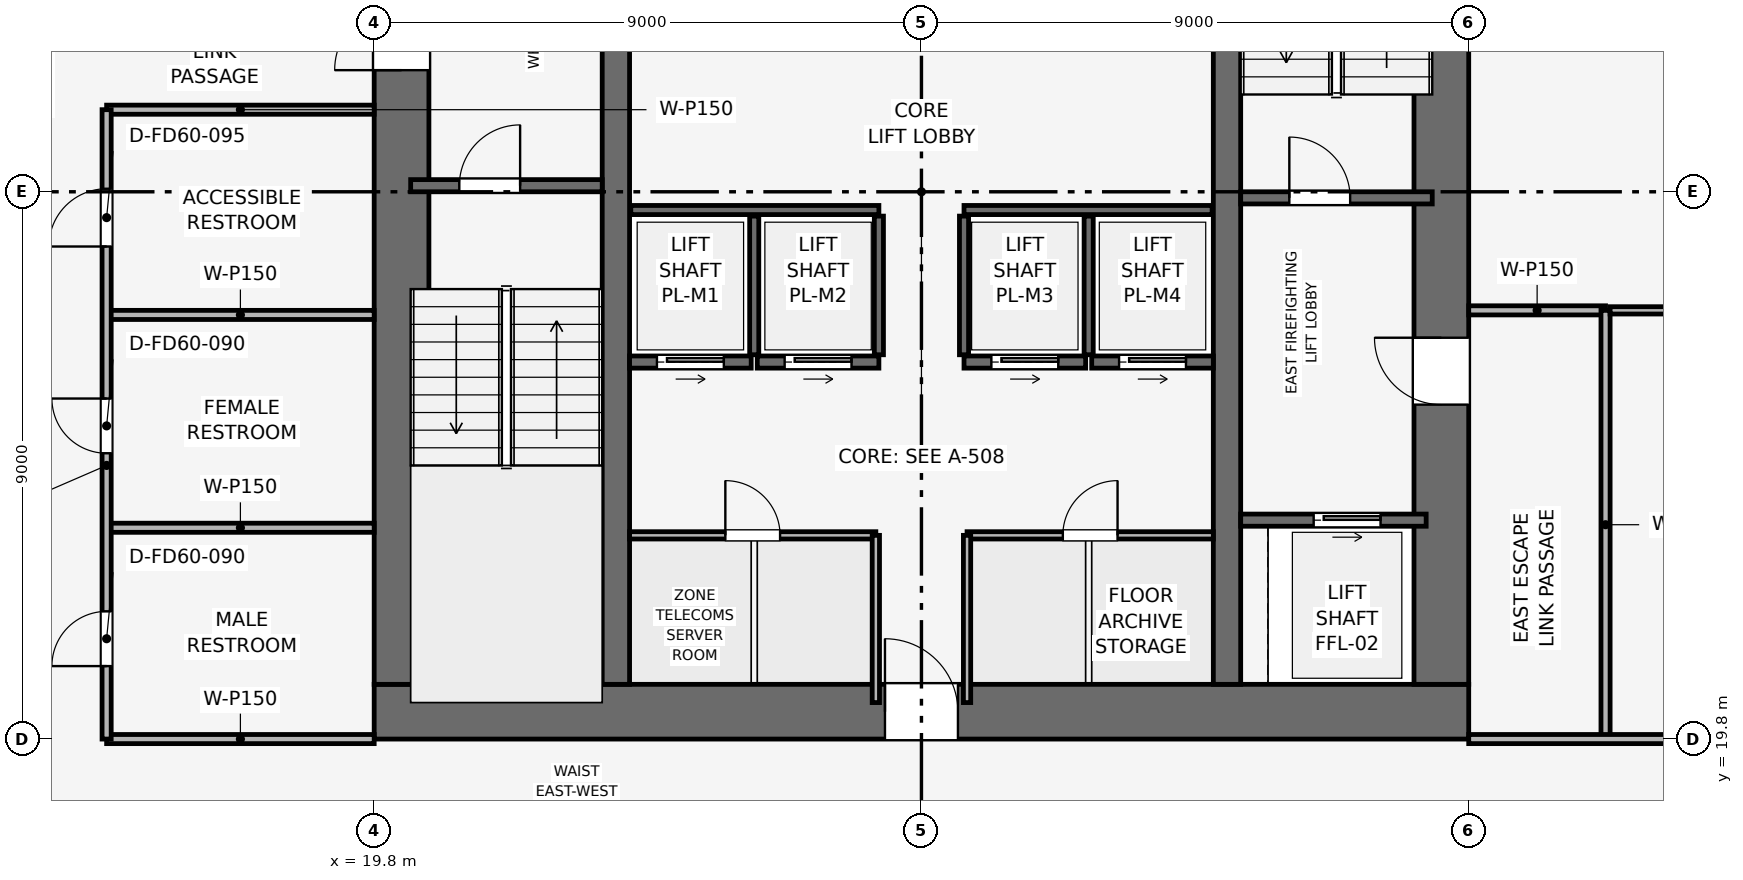
"""IFC4 building model, lengths in metres.
Left out: names, types, materials, properties, quantities, classifications, styles, units other than length and angle.
Written with IfcOpenShell. Run it as: python <this file> out.ifc"""

import sys

from ifc_helpers import new_model, si_unit, direction, frame, frame_2d, origin, place, context, subcontext, project, spatial, rectangle, extrude, element, fill, save


model = new_model("IFC4")
c1 = context("Model", 3, precision=1e-05, world=origin(), true_north=direction((0.0, 1.0)))
c2 = subcontext(c1, "Body", "Model", "MODEL_VIEW")
j1 = project(units=[si_unit("LENGTHUNIT", "METRE"), si_unit("PLANEANGLEUNIT", "RADIAN")], contexts=[c1])
p1 = place(None, origin())
s1 = spatial("IfcSite", under=j1, at=p1, CompositionType="ELEMENT")
p2 = place(p1, origin())
s2 = spatial("IfcBuilding", under=s1, at=p2, CompositionType="ELEMENT")
p3 = place(p2, frame((0.0, 0.0, 183.3)))
s3 = spatial("IfcBuildingStorey", under=s2, at=p3, CompositionType="ELEMENT", Elevation=183.3)
p4 = place(p3, frame((19.8, 20.25, 0.0), z_axis=(0.0, 0.0, 1.0), x_axis=(1.0, 0.0, 0.0)))
e1 = element("IfcWall", 1, at=p4, inside=s3, PredefinedType="SHEAR", context=c2, shape_type="SweptSolid", body=[
    extrude(rectangle(XDim=18.0, YDim=0.9, at=frame_2d((9.0, 0.0))), origin(), (0.0, 0.0, 1.0), 3.75),
])
p5 = place(p4, frame((8.4, 0.0, 0.0)))
e2 = element("IfcOpeningElement", 2, at=p5, cuts=e1, PredefinedType="OPENING", context=c2, shape_type="SweptSolid", body=[
    extrude(rectangle(XDim=1.2, YDim=2.2, at=frame_2d((0.6, 1.1))), frame((0.0, 0.46, 0.0), z_axis=(0.0, -1.0, 0.0), x_axis=(1.0, 0.0, 0.0)), (0.0, 0.0, 1.0), 0.92),
])
p6 = place(p3, frame((20.25, 20.7, 0.0), z_axis=(0.0, 0.0, 1.0), x_axis=(0.0, 1.0, 0.0)))
e3 = element("IfcWall", 3, at=p6, inside=s3, PredefinedType="SHEAR", context=c2, shape_type="SweptSolid", body=[
    extrude(rectangle(XDim=16.2, YDim=0.9, at=frame_2d((8.1, 0.0))), origin(), (0.0, 0.0, 1.0), 3.75),
])
p7 = place(p6, frame((10.1, 0.0, 0.0)))
e4 = element("IfcOpeningElement", 4, at=p7, cuts=e3, PredefinedType="OPENING", context=c2, shape_type="SweptSolid", body=[
    extrude(rectangle(XDim=1.1, YDim=2.15, at=frame_2d((0.55, 1.075))), frame((0.0, 0.46, 0.0), z_axis=(0.0, -1.0, 0.0), x_axis=(1.0, 0.0, 0.0)), (0.0, 0.0, 1.0), 0.92),
])
p8 = place(p3, frame((37.35, 20.7, 0.0), z_axis=(0.0, 0.0, 1.0), x_axis=(0.0, 1.0, 0.0)))
e5 = element("IfcWall", 5, at=p8, inside=s3, PredefinedType="SHEAR", context=c2, shape_type="SweptSolid", body=[
    extrude(rectangle(XDim=16.2, YDim=0.9, at=frame_2d((8.1, 0.0))), origin(), (0.0, 0.0, 1.0), 3.75),
])
p9 = place(p8, frame((4.6, 0.0, 0.0)))
e6 = element("IfcOpeningElement", 6, at=p9, cuts=e5, PredefinedType="OPENING", context=c2, shape_type="SweptSolid", body=[
    extrude(rectangle(XDim=1.1, YDim=2.15, at=frame_2d((0.55, 1.075))), frame((0.0, 0.46, 0.0), z_axis=(0.0, -1.0, 0.0), x_axis=(1.0, 0.0, 0.0)), (0.0, 0.0, 1.0), 0.92),
])
for number, where, z_axis, x_axis in (
    (7, (23.775, 20.7, 0.0), (0.0, 0.0, 1.0), (0.0, 1.0, 0.0)),
    (8, (33.825, 20.7, 0.0), (0.0, 0.0, 1.0), (0.0, 1.0, 0.0)),
):
    element("IfcWall", number, at=place(p3, frame(where, z_axis=z_axis, x_axis=x_axis)), inside=s3, PredefinedType="SHEAR", context=c2, shape_type="SweptSolid", body=[
        extrude(rectangle(XDim=16.2, YDim=0.45, at=frame_2d((8.1, 0.0))), origin(), (0.0, 0.0, 1.0), 3.75),
    ])
p10 = place(p3, frame((20.4, 28.9, 0.0), z_axis=(0.0, 0.0, 1.0), x_axis=(1.0, 0.0, 0.0)))
e9 = element("IfcWall", 9, at=p10, inside=s3, PredefinedType="SHEAR", context=c2, shape_type="SweptSolid", body=[
    extrude(rectangle(XDim=3.15, YDim=0.2, at=frame_2d((1.575, 0.0))), origin(), (0.0, 0.0, 1.0), 3.495),
])
p11 = place(p10, frame((0.8, 0.0, 0.0)))
e10 = element("IfcOpeningElement", 10, at=p11, cuts=e9, PredefinedType="OPENING", context=c2, shape_type="SweptSolid", body=[
    extrude(rectangle(XDim=1.0, YDim=2.1, at=frame_2d((0.5, 1.05))), frame((0.0, 0.11, 0.0), z_axis=(0.0, -1.0, 0.0), x_axis=(1.0, 0.0, 0.0)), (0.0, 0.0, 1.0), 0.22),
])
p12 = place(p3, frame((34.05, 28.7, 0.0), z_axis=(0.0, 0.0, 1.0), x_axis=(1.0, 0.0, 0.0)))
e11 = element("IfcWall", 11, at=p12, inside=s3, PredefinedType="SHEAR", context=c2, shape_type="SweptSolid", body=[
    extrude(rectangle(XDim=3.15, YDim=0.2, at=frame_2d((1.575, 0.0))), origin(), (0.0, 0.0, 1.0), 3.495),
])
p13 = place(p12, frame((0.8, 0.0, 0.0)))
e12 = element("IfcOpeningElement", 12, at=p13, cuts=e11, PredefinedType="OPENING", context=c2, shape_type="SweptSolid", body=[
    extrude(rectangle(XDim=1.0, YDim=2.1, at=frame_2d((0.5, 1.05))), frame((0.0, 0.11, 0.0), z_axis=(0.0, -1.0, 0.0), x_axis=(1.0, 0.0, 0.0)), (0.0, 0.0, 1.0), 0.22),
])
p14 = place(p3, frame((34.05, 23.4, 0.0), z_axis=(0.0, 0.0, 1.0), x_axis=(1.0, 0.0, 0.0)))
e13 = element("IfcWall", 13, at=p14, inside=s3, PredefinedType="SHEAR", context=c2, shape_type="SweptSolid", body=[
    extrude(rectangle(XDim=3.05, YDim=0.2, at=frame_2d((1.525, 0.0))), origin(), (0.0, 0.0, 1.0), 3.495),
])
p15 = place(p14, frame((1.2, 0.0, 0.0)))
e14 = element("IfcOpeningElement", 14, at=p15, cuts=e13, PredefinedType="OPENING", context=c2, shape_type="SweptSolid", body=[
    extrude(rectangle(XDim=1.1, YDim=2.15, at=frame_2d((0.55, 1.075))), frame((0.0, 0.11, 0.0), z_axis=(0.0, -1.0, 0.0), x_axis=(1.0, 0.0, 0.0)), (0.0, 0.0, 1.0), 0.22),
])
p16 = place(p3, frame((24.0, 26.0, 0.0), z_axis=(0.0, 0.0, 1.0), x_axis=(1.0, 0.0, 0.0)))
e15 = element("IfcWall", 15, at=p16, inside=s3, PredefinedType="SHEAR", context=c2, shape_type="SweptSolid", body=[
    extrude(rectangle(XDim=2.0, YDim=0.2, at=frame_2d((1.0, 0.0))), origin(), (0.0, 0.0, 1.0), 3.495),
])
p17 = place(p16, frame((0.45, 0.0, 0.0)))
e16 = element("IfcOpeningElement", 16, at=p17, cuts=e15, PredefinedType="OPENING", context=c2, shape_type="SweptSolid", body=[
    extrude(rectangle(XDim=1.1, YDim=2.15, at=frame_2d((0.55, 1.075))), frame((0.0, 0.11, 0.0), z_axis=(0.0, -1.0, 0.0), x_axis=(1.0, 0.0, 0.0)), (0.0, 0.0, 1.0), 0.22),
])
p18 = place(p3, frame((26.1, 26.0, 0.0), z_axis=(0.0, 0.0, 1.0), x_axis=(1.0, 0.0, 0.0)))
e17 = element("IfcWall", 17, at=p18, inside=s3, PredefinedType="SHEAR", context=c2, shape_type="SweptSolid", body=[
    extrude(rectangle(XDim=2.0, YDim=0.2, at=frame_2d((1.0, 0.0))), origin(), (0.0, 0.0, 1.0), 3.495),
])
p19 = place(p18, frame((0.45, 0.0, 0.0)))
e18 = element("IfcOpeningElement", 18, at=p19, cuts=e17, PredefinedType="OPENING", context=c2, shape_type="SweptSolid", body=[
    extrude(rectangle(XDim=1.1, YDim=2.15, at=frame_2d((0.55, 1.075))), frame((0.0, 0.11, 0.0), z_axis=(0.0, -1.0, 0.0), x_axis=(1.0, 0.0, 0.0)), (0.0, 0.0, 1.0), 0.22),
])
p20 = place(p3, frame((29.5, 26.0, 0.0), z_axis=(0.0, 0.0, 1.0), x_axis=(1.0, 0.0, 0.0)))
e19 = element("IfcWall", 19, at=p20, inside=s3, PredefinedType="SHEAR", context=c2, shape_type="SweptSolid", body=[
    extrude(rectangle(XDim=2.0, YDim=0.2, at=frame_2d((1.0, 0.0))), origin(), (0.0, 0.0, 1.0), 3.495),
])
p21 = place(p20, frame((0.45, 0.0, 0.0)))
e20 = element("IfcOpeningElement", 20, at=p21, cuts=e19, PredefinedType="OPENING", context=c2, shape_type="SweptSolid", body=[
    extrude(rectangle(XDim=1.1, YDim=2.15, at=frame_2d((0.55, 1.075))), frame((0.0, 0.11, 0.0), z_axis=(0.0, -1.0, 0.0), x_axis=(1.0, 0.0, 0.0)), (0.0, 0.0, 1.0), 0.22),
])
p22 = place(p3, frame((31.6, 26.0, 0.0), z_axis=(0.0, 0.0, 1.0), x_axis=(1.0, 0.0, 0.0)))
e21 = element("IfcWall", 21, at=p22, inside=s3, PredefinedType="SHEAR", context=c2, shape_type="SweptSolid", body=[
    extrude(rectangle(XDim=2.0, YDim=0.2, at=frame_2d((1.0, 0.0))), origin(), (0.0, 0.0, 1.0), 3.495),
])
p23 = place(p22, frame((0.45, 0.0, 0.0)))
e22 = element("IfcOpeningElement", 22, at=p23, cuts=e21, PredefinedType="OPENING", context=c2, shape_type="SweptSolid", body=[
    extrude(rectangle(XDim=1.1, YDim=2.15, at=frame_2d((0.55, 1.075))), frame((0.0, 0.11, 0.0), z_axis=(0.0, -1.0, 0.0), x_axis=(1.0, 0.0, 0.0)), (0.0, 0.0, 1.0), 0.22),
])
for number, where, z_axis, x_axis in (
    (23, (24.02, 28.5, 0.0), (0.0, 0.0, 1.0), (1.0, 0.0, 0.0)),
    (24, (29.5, 28.5, 0.0), (0.0, 0.0, 1.0), (1.0, 0.0, 0.0)),
):
    element("IfcWall", number, at=place(p3, frame(where, z_axis=z_axis, x_axis=x_axis)), inside=s3, PredefinedType="SHEAR", context=c2, shape_type="SweptSolid", body=[
        extrude(rectangle(XDim=4.08, YDim=0.15, at=frame_2d((2.04, 0.0))), origin(), (0.0, 0.0, 1.0), 3.495),
    ])
for number, where, z_axis, x_axis in (
    (25, (26.05, 26.12, 0.0), (0.0, 0.0, 1.0), (0.0, 1.0, 0.0)),
    (26, (28.1, 26.12, 0.0), (0.0, 0.0, 1.0), (0.0, 1.0, 0.0)),
    (27, (29.5, 26.12, 0.0), (0.0, 0.0, 1.0), (0.0, 1.0, 0.0)),
    (28, (31.55, 26.12, 0.0), (0.0, 0.0, 1.0), (0.0, 1.0, 0.0)),
):
    element("IfcWall", number, at=place(p3, frame(where, z_axis=z_axis, x_axis=x_axis)), inside=s3, PredefinedType="SHEAR", context=c2, shape_type="SweptSolid", body=[
        extrude(rectangle(XDim=2.28, YDim=0.15, at=frame_2d((1.14, 0.0))), origin(), (0.0, 0.0, 1.0), 3.495),
    ])
p24 = place(p3, frame((24.0, 23.15, 0.0), z_axis=(0.0, 0.0, 1.0), x_axis=(1.0, 0.0, 0.0)))
e29 = element("IfcWall", 29, at=p24, inside=s3, PredefinedType="PARTITIONING", context=c2, shape_type="SweptSolid", body=[
    extrude(rectangle(XDim=4.05, YDim=0.12, at=frame_2d((2.025, 0.0))), origin(), (0.0, 0.0, 1.0), 3.495),
])
p25 = place(p24, frame((1.575, 0.0, 0.0)))
e30 = element("IfcOpeningElement", 30, at=p25, cuts=e29, PredefinedType="OPENING", context=c2, shape_type="SweptSolid", body=[
    extrude(rectangle(XDim=0.9, YDim=2.1, at=frame_2d((0.45, 1.05))), frame((0.0, 0.07, 0.0), z_axis=(0.0, -1.0, 0.0), x_axis=(1.0, 0.0, 0.0)), (0.0, 0.0, 1.0), 0.14),
])
p26 = place(p3, frame((28.05, 20.4, 0.0), z_axis=(0.0, 0.0, 1.0), x_axis=(0.0, 1.0, 0.0)))
e31 = element("IfcWall", 31, at=p26, inside=s3, PredefinedType="PARTITIONING", context=c2, shape_type="SweptSolid", body=[
    extrude(rectangle(XDim=2.75, YDim=0.12, at=frame_2d((1.375, 0.0))), origin(), (0.0, 0.0, 1.0), 3.495),
])
p27 = place(p3, frame((29.55, 23.15, 0.0), z_axis=(0.0, 0.0, 1.0), x_axis=(1.0, 0.0, 0.0)))
e32 = element("IfcWall", 32, at=p27, inside=s3, PredefinedType="PARTITIONING", context=c2, shape_type="SweptSolid", body=[
    extrude(rectangle(XDim=4.05, YDim=0.12, at=frame_2d((2.025, 0.0))), origin(), (0.0, 0.0, 1.0), 3.495),
])
p28 = place(p27, frame((1.575, 0.0, 0.0)))
e33 = element("IfcOpeningElement", 33, at=p28, cuts=e32, PredefinedType="OPENING", context=c2, shape_type="SweptSolid", body=[
    extrude(rectangle(XDim=0.9, YDim=2.1, at=frame_2d((0.45, 1.05))), frame((0.0, 0.07, 0.0), z_axis=(0.0, -1.0, 0.0), x_axis=(1.0, 0.0, 0.0)), (0.0, 0.0, 1.0), 0.14),
])
p29 = place(p3, frame((29.55, 20.4, 0.0), z_axis=(0.0, 0.0, 1.0), x_axis=(0.0, 1.0, 0.0)))
e34 = element("IfcWall", 34, at=p29, inside=s3, PredefinedType="PARTITIONING", context=c2, shape_type="SweptSolid", body=[
    extrude(rectangle(XDim=2.75, YDim=0.12, at=frame_2d((1.375, 0.0))), origin(), (0.0, 0.0, 1.0), 3.495),
])
p30 = place(p3, frame((15.4, 19.8, 0.0), z_axis=(0.0, 0.0, 1.0), x_axis=(1.0, 0.0, 0.0)))
e35 = element("IfcWall", 35, at=p30, inside=s3, PredefinedType="PARTITIONING", context=c2, shape_type="SweptSolid", body=[
    extrude(rectangle(XDim=4.4, YDim=0.15, at=frame_2d((2.2, 0.0))), origin(), (0.0, 0.0, 1.0), 3.03),
])
for number, where, z_axis, x_axis in (
    (36, (15.4, 23.275, 0.0), (0.0, 0.0, 1.0), (1.0, 0.0, 0.0)),
    (37, (15.4, 26.775, 0.0), (0.0, 0.0, 1.0), (1.0, 0.0, 0.0)),
    (38, (15.4, 30.15, 0.0), (0.0, 0.0, 1.0), (1.0, 0.0, 0.0)),
):
    element("IfcWall", number, at=place(p3, frame(where, z_axis=z_axis, x_axis=x_axis)), inside=s3, PredefinedType="PARTITIONING", context=c2, shape_type="SweptSolid", body=[
        extrude(rectangle(XDim=4.4, YDim=0.15, at=frame_2d((2.2, 0.0))), origin(), (0.0, 0.0, 1.0), 3.495),
    ])
p31 = place(p3, frame((15.4, 19.8, 0.0), z_axis=(0.0, 0.0, 1.0), x_axis=(0.0, 1.0, 0.0)))
e39 = element("IfcWall", 39, at=p31, inside=s3, PredefinedType="PARTITIONING", context=c2, shape_type="SweptSolid", body=[
    extrude(rectangle(XDim=10.35, YDim=0.15, at=frame_2d((5.175, 0.0))), origin(), (0.0, 0.0, 1.0), 3.03),
])
p32 = place(p31, frame((1.2, 0.0, 0.0)))
e40 = element("IfcOpeningElement", 40, at=p32, cuts=e39, PredefinedType="OPENING", context=c2, shape_type="SweptSolid", body=[
    extrude(rectangle(XDim=0.9, YDim=2.1, at=frame_2d((0.45, 1.05))), frame((0.0, 0.085, 0.0), z_axis=(0.0, -1.0, 0.0), x_axis=(1.0, 0.0, 0.0)), (0.0, 0.0, 1.0), 0.17),
])
p33 = place(p31, frame((4.7, 0.0, 0.0)))
e41 = element("IfcOpeningElement", 41, at=p33, cuts=e39, PredefinedType="OPENING", context=c2, shape_type="SweptSolid", body=[
    extrude(rectangle(XDim=0.9, YDim=2.1, at=frame_2d((0.45, 1.05))), frame((0.0, 0.085, 0.0), z_axis=(0.0, -1.0, 0.0), x_axis=(1.0, 0.0, 0.0)), (0.0, 0.0, 1.0), 0.17),
])
p34 = place(p31, frame((8.1, 0.0, 0.0)))
e42 = element("IfcOpeningElement", 42, at=p34, cuts=e39, PredefinedType="OPENING", context=c2, shape_type="SweptSolid", body=[
    extrude(rectangle(XDim=0.95, YDim=2.1, at=frame_2d((0.475, 1.05))), frame((0.0, 0.085, 0.0), z_axis=(0.0, -1.0, 0.0), x_axis=(1.0, 0.0, 0.0)), (0.0, 0.0, 1.0), 0.17),
])
p35 = place(p3, frame((37.8, 26.85, 0.0), z_axis=(0.0, 0.0, 1.0), x_axis=(1.0, 0.0, 0.0)))
e43 = element("IfcWall", 43, at=p35, inside=s3, PredefinedType="PARTITIONING", context=c2, shape_type="SweptSolid", body=[
    extrude(rectangle(XDim=2.25, YDim=0.15, at=frame_2d((1.125, 0.0))), origin(), (0.0, 0.0, 1.0), 3.495),
])
p36 = place(p3, frame((40.05, 19.8, 0.0), z_axis=(0.0, 0.0, 1.0), x_axis=(0.0, 1.0, 0.0)))
e44 = element("IfcWall", 44, at=p36, inside=s3, PredefinedType="PARTITIONING", context=c2, shape_type="SweptSolid", body=[
    extrude(rectangle(XDim=7.05, YDim=0.15, at=frame_2d((3.525, 0.0))), origin(), (0.0, 0.0, 1.0), 3.03),
])
p37 = place(p3, frame((40.125, 26.85, 0.0), z_axis=(0.0, 0.0, 1.0), x_axis=(1.0, 0.0, 0.0)))
e45 = element("IfcWall", 45, at=p37, inside=s3, PredefinedType="PARTITIONING", context=c2, shape_type="SweptSolid", body=[
    extrude(rectangle(XDim=12.845, YDim=0.12, at=frame_2d((6.422, 0.0))), origin(), (0.0, 0.0, 1.0), 2.98),
])
p38 = place(p3, frame((37.8, 19.8, 0.0), z_axis=(0.0, 0.0, 1.0), x_axis=(1.0, 0.0, 0.0)))
e46 = element("IfcWall", 46, at=p38, inside=s3, PredefinedType="PARTITIONING", context=c2, shape_type="SweptSolid", body=[
    extrude(rectangle(XDim=15.17, YDim=0.15, at=frame_2d((7.585, 0.0))), origin(), (0.0, 0.0, 1.0), 2.98),
])
p39 = place(p38, frame((4.4, 0.0, 0.0)))
e47 = element("IfcOpeningElement", 47, at=p39, cuts=e46, PredefinedType="OPENING", context=c2, shape_type="SweptSolid", body=[
    extrude(rectangle(XDim=0.9, YDim=2.1, at=frame_2d((0.45, 1.05))), frame((0.0, 0.085, 0.0), z_axis=(0.0, -1.0, 0.0), x_axis=(1.0, 0.0, 0.0)), (0.0, 0.0, 1.0), 0.17),
])
p40 = place(p11, origin())
e48 = element("IfcDoor", 48, at=p40, inside=s3, OperationType="SINGLE_SWING_RIGHT", PredefinedType="DOOR", context=c2, shape_type="SweptSolid", body=[
    extrude(rectangle(XDim=1.0, YDim=2.1, at=frame_2d((0.5, 1.05))), frame((0.0, 0.025, 0.0), z_axis=(0.0, -1.0, 0.0), x_axis=(1.0, 0.0, 0.0)), (0.0, 0.0, 1.0), 0.05),
])
fill(e10, e48)
p41 = place(p13, origin())
e49 = element("IfcDoor", 49, at=p41, inside=s3, OperationType="SINGLE_SWING_LEFT", PredefinedType="DOOR", context=c2, shape_type="SweptSolid", body=[
    extrude(rectangle(XDim=1.0, YDim=2.1, at=frame_2d((0.5, 1.05))), frame((0.0, 0.025, 0.0), z_axis=(0.0, -1.0, 0.0), x_axis=(1.0, 0.0, 0.0)), (0.0, 0.0, 1.0), 0.05),
])
fill(e12, e49)
p42 = place(p15, origin())
e50 = element("IfcDoor", 50, at=p42, inside=s3, OperationType="SLIDING_TO_RIGHT", PredefinedType="DOOR", context=c2, shape_type="SweptSolid", body=[
    extrude(rectangle(XDim=1.1, YDim=2.15, at=frame_2d((0.55, 1.075))), frame((0.0, 0.025, 0.0), z_axis=(0.0, -1.0, 0.0), x_axis=(1.0, 0.0, 0.0)), (0.0, 0.0, 1.0), 0.05),
])
fill(e14, e50)
p43 = place(p17, origin())
e51 = element("IfcDoor", 51, at=p43, inside=s3, OperationType="SLIDING_TO_RIGHT", PredefinedType="DOOR", context=c2, shape_type="SweptSolid", body=[
    extrude(rectangle(XDim=1.1, YDim=2.15, at=frame_2d((0.55, 1.075))), frame((0.0, 0.025, 0.0), z_axis=(0.0, -1.0, 0.0), x_axis=(1.0, 0.0, 0.0)), (0.0, 0.0, 1.0), 0.05),
])
fill(e16, e51)
p44 = place(p19, origin())
e52 = element("IfcDoor", 52, at=p44, inside=s3, OperationType="SLIDING_TO_RIGHT", PredefinedType="DOOR", context=c2, shape_type="SweptSolid", body=[
    extrude(rectangle(XDim=1.1, YDim=2.15, at=frame_2d((0.55, 1.075))), frame((0.0, 0.025, 0.0), z_axis=(0.0, -1.0, 0.0), x_axis=(1.0, 0.0, 0.0)), (0.0, 0.0, 1.0), 0.05),
])
fill(e18, e52)
p45 = place(p21, origin())
e53 = element("IfcDoor", 53, at=p45, inside=s3, OperationType="SLIDING_TO_RIGHT", PredefinedType="DOOR", context=c2, shape_type="SweptSolid", body=[
    extrude(rectangle(XDim=1.1, YDim=2.15, at=frame_2d((0.55, 1.075))), frame((0.0, 0.025, 0.0), z_axis=(0.0, -1.0, 0.0), x_axis=(1.0, 0.0, 0.0)), (0.0, 0.0, 1.0), 0.05),
])
fill(e20, e53)
p46 = place(p23, origin())
e54 = element("IfcDoor", 54, at=p46, inside=s3, OperationType="SLIDING_TO_RIGHT", PredefinedType="DOOR", context=c2, shape_type="SweptSolid", body=[
    extrude(rectangle(XDim=1.1, YDim=2.15, at=frame_2d((0.55, 1.075))), frame((0.0, 0.025, 0.0), z_axis=(0.0, -1.0, 0.0), x_axis=(1.0, 0.0, 0.0)), (0.0, 0.0, 1.0), 0.05),
])
fill(e22, e54)
p47 = place(p25, origin())
e55 = element("IfcDoor", 55, at=p47, inside=s3, OperationType="SINGLE_SWING_LEFT", PredefinedType="DOOR", context=c2, shape_type="SweptSolid", body=[
    extrude(rectangle(XDim=0.9, YDim=2.1, at=frame_2d((0.45, 1.05))), frame((0.0, 0.025, 0.0), z_axis=(0.0, -1.0, 0.0), x_axis=(1.0, 0.0, 0.0)), (0.0, 0.0, 1.0), 0.05),
])
fill(e30, e55)
p48 = place(p28, origin())
e56 = element("IfcDoor", 56, at=p48, inside=s3, OperationType="SINGLE_SWING_RIGHT", PredefinedType="DOOR", context=c2, shape_type="SweptSolid", body=[
    extrude(rectangle(XDim=0.9, YDim=2.1, at=frame_2d((0.45, 1.05))), frame((0.0, 0.025, 0.0), z_axis=(0.0, -1.0, 0.0), x_axis=(1.0, 0.0, 0.0)), (0.0, 0.0, 1.0), 0.05),
])
fill(e33, e56)
p49 = place(p32, origin())
e57 = element("IfcDoor", 57, at=p49, inside=s3, OperationType="SINGLE_SWING_LEFT", PredefinedType="DOOR", context=c2, shape_type="SweptSolid", body=[
    extrude(rectangle(XDim=0.9, YDim=2.1, at=frame_2d((0.45, 1.05))), frame((0.0, 0.025, 0.0), z_axis=(0.0, -1.0, 0.0), x_axis=(1.0, 0.0, 0.0)), (0.0, 0.0, 1.0), 0.05),
])
fill(e40, e57)
p50 = place(p33, origin())
e58 = element("IfcDoor", 58, at=p50, inside=s3, OperationType="SINGLE_SWING_RIGHT", PredefinedType="DOOR", context=c2, shape_type="SweptSolid", body=[
    extrude(rectangle(XDim=0.9, YDim=2.1, at=frame_2d((0.45, 1.05))), frame((0.0, 0.025, 0.0), z_axis=(0.0, -1.0, 0.0), x_axis=(1.0, 0.0, 0.0)), (0.0, 0.0, 1.0), 0.05),
])
fill(e41, e58)
p51 = place(p34, origin())
e59 = element("IfcDoor", 59, at=p51, inside=s3, OperationType="SINGLE_SWING_LEFT", PredefinedType="DOOR", context=c2, shape_type="SweptSolid", body=[
    extrude(rectangle(XDim=0.95, YDim=2.1, at=frame_2d((0.475, 1.05))), frame((0.0, 0.025, 0.0), z_axis=(0.0, -1.0, 0.0), x_axis=(1.0, 0.0, 0.0)), (0.0, 0.0, 1.0), 0.05),
])
fill(e42, e59)
p52 = place(p7, origin())
e60 = element("IfcDoor", 60, at=p52, inside=s3, OperationType="SINGLE_SWING_LEFT", PredefinedType="DOOR", context=c2, shape_type="SweptSolid", body=[
    extrude(rectangle(XDim=1.1, YDim=2.15, at=frame_2d((0.55, 1.075))), frame((0.0, 0.025, 0.0), z_axis=(0.0, -1.0, 0.0), x_axis=(1.0, 0.0, 0.0)), (0.0, 0.0, 1.0), 0.05),
])
fill(e4, e60)
p53 = place(p9, origin())
e61 = element("IfcDoor", 61, at=p53, inside=s3, OperationType="SINGLE_SWING_RIGHT", PredefinedType="DOOR", context=c2, shape_type="SweptSolid", body=[
    extrude(rectangle(XDim=1.1, YDim=2.15, at=frame_2d((0.55, 1.075))), frame((0.0, 0.025, 0.0), z_axis=(0.0, -1.0, 0.0), x_axis=(1.0, 0.0, 0.0)), (0.0, 0.0, 1.0), 0.05),
])
fill(e6, e61)
p54 = place(p5, origin())
e62 = element("IfcDoor", 62, at=p54, inside=s3, OperationType="SINGLE_SWING_LEFT", PredefinedType="DOOR", context=c2, shape_type="SweptSolid", body=[
    extrude(rectangle(XDim=1.2, YDim=2.2, at=frame_2d((0.6, 1.1))), frame((0.0, 0.025, 0.0), z_axis=(0.0, -1.0, 0.0), x_axis=(1.0, 0.0, 0.0)), (0.0, 0.0, 1.0), 0.05),
])
fill(e2, e62)
save(model, sys.argv[1])
